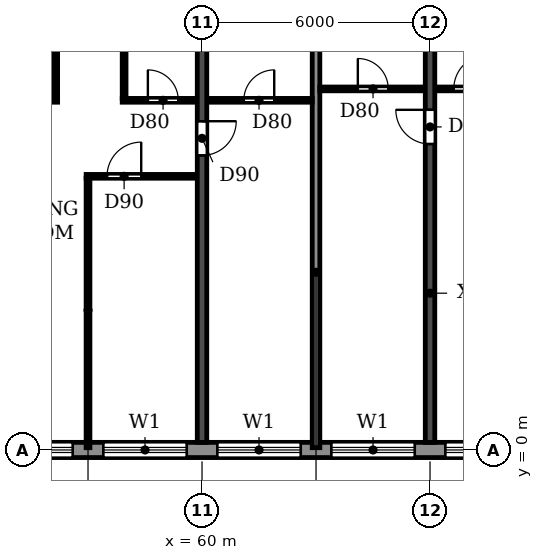
"""IFC4 building model, lengths in metres.
Left out: names, types, materials, properties, quantities, classifications, styles, units other than length and angle.
Written with IfcOpenShell. Run it as: python <this file> out.ifc"""

import sys

from ifc_helpers import new_model, si_unit, direction, frame, frame_2d, origin, place, context, subcontext, project, spatial, rectangle, extrude, element, fill, save


model = new_model("IFC4")
c1 = context("Model", 3, precision=1e-05, world=origin(), true_north=direction((0.0, 1.0)))
c2 = subcontext(c1, "Body", "Model", "MODEL_VIEW")
j1 = project(units=[si_unit("LENGTHUNIT", "METRE"), si_unit("PLANEANGLEUNIT", "RADIAN")], contexts=[c1])
p1 = place(None, origin())
s1 = spatial("IfcSite", under=j1, at=p1, CompositionType="ELEMENT")
p2 = place(p1, origin())
s2 = spatial("IfcBuilding", under=s1, at=p2, CompositionType="ELEMENT")
p3 = place(p2, frame((0.0, 0.0, 201.6)))
s3 = spatial("IfcBuildingStorey", under=s2, at=p3, CompositionType="ELEMENT", Elevation=201.6)
p4 = place(p3, frame((60.0, 0.2, 0.0), z_axis=(0.0, 0.0, 1.0), x_axis=(0.0, 1.0, 0.0)))
e1 = element("IfcWall", 1, at=p4, inside=s3, PredefinedType="SHEAR", context=c2, shape_type="SweptSolid", body=[
    extrude(rectangle(XDim=11.7, YDim=0.25, at=frame_2d((5.85, 0.0))), origin(), (0.0, 0.0, 1.0), 3.08),
])
p5 = place(p4, frame((7.55, 0.0, 0.0)))
e2 = element("IfcOpeningElement", 2, at=p5, cuts=e1, PredefinedType="OPENING", context=c2, shape_type="SweptSolid", body=[
    extrude(rectangle(XDim=0.9, YDim=2.1, at=frame_2d((0.45, 1.05))), frame((0.0, 0.135, 0.0), z_axis=(0.0, -1.0, 0.0), x_axis=(1.0, 0.0, 0.0)), (0.0, 0.0, 1.0), 0.27),
])
p6 = place(p3, frame((66.0, 0.2, 0.0), z_axis=(0.0, 0.0, 1.0), x_axis=(0.0, 1.0, 0.0)))
e3 = element("IfcWall", 3, at=p6, inside=s3, PredefinedType="SHEAR", context=c2, shape_type="SweptSolid", body=[
    extrude(rectangle(XDim=11.7, YDim=0.25, at=frame_2d((5.85, 0.0))), origin(), (0.0, 0.0, 1.0), 3.08),
])
p7 = place(p6, frame((7.85, 0.0, 0.0)))
e4 = element("IfcOpeningElement", 4, at=p7, cuts=e3, PredefinedType="OPENING", context=c2, shape_type="SweptSolid", body=[
    extrude(rectangle(XDim=0.9, YDim=2.1, at=frame_2d((0.45, 1.05))), frame((0.0, 0.135, 0.0), z_axis=(0.0, -1.0, 0.0), x_axis=(1.0, 0.0, 0.0)), (0.0, 0.0, 1.0), 0.27),
])
p8 = place(p3, frame((22.683, 0.0, 0.0), z_axis=(0.0, 0.0, 1.0), x_axis=(1.0, 0.0, 0.0)))
e5 = element("IfcWall", 5, at=p8, inside=s3, PredefinedType="STANDARD", context=c2, shape_type="SweptSolid", body=[
    extrude(rectangle(XDim=56.634, YDim=0.4, at=frame_2d((28.317, 0.0))), origin(), (0.0, 0.0, 1.0), 3.08),
])
p9 = place(p8, frame((1.917, 0.0, 0.0)))
e6 = element("IfcOpeningElement", 6, at=p9, cuts=e5, PredefinedType="OPENING", context=c2, shape_type="SweptSolid", body=[
    extrude(rectangle(XDim=1.8, YDim=2.4, at=frame_2d((0.9, 1.2))), frame((0.0, 0.21, 0.0), z_axis=(0.0, -1.0, 0.0), x_axis=(1.0, 0.0, 0.0)), (0.0, 0.0, 1.0), 0.42),
])
p10 = place(p8, frame((4.717, 0.0, 0.9)))
e7 = element("IfcOpeningElement", 7, at=p10, cuts=e5, PredefinedType="OPENING", context=c2, shape_type="SweptSolid", body=[
    extrude(rectangle(XDim=2.2, YDim=1.5, at=frame_2d((1.1, 0.75))), frame((0.0, 0.21, 0.0), z_axis=(0.0, -1.0, 0.0), x_axis=(1.0, 0.0, 0.0)), (0.0, 0.0, 1.0), 0.42),
])
p11 = place(p8, frame((7.717, 0.0, 0.9)))
e8 = element("IfcOpeningElement", 8, at=p11, cuts=e5, PredefinedType="OPENING", context=c2, shape_type="SweptSolid", body=[
    extrude(rectangle(XDim=2.2, YDim=1.5, at=frame_2d((1.1, 0.75))), frame((0.0, 0.21, 0.0), z_axis=(0.0, -1.0, 0.0), x_axis=(1.0, 0.0, 0.0)), (0.0, 0.0, 1.0), 0.42),
])
p12 = place(p8, frame((10.717, 0.0, 0.9)))
e9 = element("IfcOpeningElement", 9, at=p12, cuts=e5, PredefinedType="OPENING", context=c2, shape_type="SweptSolid", body=[
    extrude(rectangle(XDim=2.2, YDim=1.5, at=frame_2d((1.1, 0.75))), frame((0.0, 0.21, 0.0), z_axis=(0.0, -1.0, 0.0), x_axis=(1.0, 0.0, 0.0)), (0.0, 0.0, 1.0), 0.42),
])
p13 = place(p8, frame((13.917, 0.0, 0.0)))
e10 = element("IfcOpeningElement", 10, at=p13, cuts=e5, PredefinedType="OPENING", context=c2, shape_type="SweptSolid", body=[
    extrude(rectangle(XDim=1.8, YDim=2.4, at=frame_2d((0.9, 1.2))), frame((0.0, 0.21, 0.0), z_axis=(0.0, -1.0, 0.0), x_axis=(1.0, 0.0, 0.0)), (0.0, 0.0, 1.0), 0.42),
])
p14 = place(p8, frame((16.717, 0.0, 0.9)))
e11 = element("IfcOpeningElement", 11, at=p14, cuts=e5, PredefinedType="OPENING", context=c2, shape_type="SweptSolid", body=[
    extrude(rectangle(XDim=2.2, YDim=1.5, at=frame_2d((1.1, 0.75))), frame((0.0, 0.21, 0.0), z_axis=(0.0, -1.0, 0.0), x_axis=(1.0, 0.0, 0.0)), (0.0, 0.0, 1.0), 0.42),
])
p15 = place(p8, frame((19.717, 0.0, 0.9)))
e12 = element("IfcOpeningElement", 12, at=p15, cuts=e5, PredefinedType="OPENING", context=c2, shape_type="SweptSolid", body=[
    extrude(rectangle(XDim=2.2, YDim=1.5, at=frame_2d((1.1, 0.75))), frame((0.0, 0.21, 0.0), z_axis=(0.0, -1.0, 0.0), x_axis=(1.0, 0.0, 0.0)), (0.0, 0.0, 1.0), 0.42),
])
p16 = place(p8, frame((22.717, 0.0, 0.9)))
e13 = element("IfcOpeningElement", 13, at=p16, cuts=e5, PredefinedType="OPENING", context=c2, shape_type="SweptSolid", body=[
    extrude(rectangle(XDim=2.2, YDim=1.5, at=frame_2d((1.1, 0.75))), frame((0.0, 0.21, 0.0), z_axis=(0.0, -1.0, 0.0), x_axis=(1.0, 0.0, 0.0)), (0.0, 0.0, 1.0), 0.42),
])
p17 = place(p8, frame((25.917, 0.0, 0.0)))
e14 = element("IfcOpeningElement", 14, at=p17, cuts=e5, PredefinedType="OPENING", context=c2, shape_type="SweptSolid", body=[
    extrude(rectangle(XDim=1.8, YDim=2.4, at=frame_2d((0.9, 1.2))), frame((0.0, 0.21, 0.0), z_axis=(0.0, -1.0, 0.0), x_axis=(1.0, 0.0, 0.0)), (0.0, 0.0, 1.0), 0.42),
])
p18 = place(p8, frame((28.717, 0.0, 0.9)))
e15 = element("IfcOpeningElement", 15, at=p18, cuts=e5, PredefinedType="OPENING", context=c2, shape_type="SweptSolid", body=[
    extrude(rectangle(XDim=2.2, YDim=1.5, at=frame_2d((1.1, 0.75))), frame((0.0, 0.21, 0.0), z_axis=(0.0, -1.0, 0.0), x_axis=(1.0, 0.0, 0.0)), (0.0, 0.0, 1.0), 0.42),
])
p19 = place(p8, frame((31.717, 0.0, 0.9)))
e16 = element("IfcOpeningElement", 16, at=p19, cuts=e5, PredefinedType="OPENING", context=c2, shape_type="SweptSolid", body=[
    extrude(rectangle(XDim=2.2, YDim=1.5, at=frame_2d((1.1, 0.75))), frame((0.0, 0.21, 0.0), z_axis=(0.0, -1.0, 0.0), x_axis=(1.0, 0.0, 0.0)), (0.0, 0.0, 1.0), 0.42),
])
p20 = place(p8, frame((34.717, 0.0, 0.9)))
e17 = element("IfcOpeningElement", 17, at=p20, cuts=e5, PredefinedType="OPENING", context=c2, shape_type="SweptSolid", body=[
    extrude(rectangle(XDim=2.2, YDim=1.5, at=frame_2d((1.1, 0.75))), frame((0.0, 0.21, 0.0), z_axis=(0.0, -1.0, 0.0), x_axis=(1.0, 0.0, 0.0)), (0.0, 0.0, 1.0), 0.42),
])
p21 = place(p8, frame((37.717, 0.0, 0.9)))
e18 = element("IfcOpeningElement", 18, at=p21, cuts=e5, PredefinedType="OPENING", context=c2, shape_type="SweptSolid", body=[
    extrude(rectangle(XDim=2.2, YDim=1.5, at=frame_2d((1.1, 0.75))), frame((0.0, 0.21, 0.0), z_axis=(0.0, -1.0, 0.0), x_axis=(1.0, 0.0, 0.0)), (0.0, 0.0, 1.0), 0.42),
])
p22 = place(p8, frame((40.717, 0.0, 0.9)))
e19 = element("IfcOpeningElement", 19, at=p22, cuts=e5, PredefinedType="OPENING", context=c2, shape_type="SweptSolid", body=[
    extrude(rectangle(XDim=2.2, YDim=1.5, at=frame_2d((1.1, 0.75))), frame((0.0, 0.21, 0.0), z_axis=(0.0, -1.0, 0.0), x_axis=(1.0, 0.0, 0.0)), (0.0, 0.0, 1.0), 0.42),
])
p23 = place(p8, frame((43.717, 0.0, 0.9)))
e20 = element("IfcOpeningElement", 20, at=p23, cuts=e5, PredefinedType="OPENING", context=c2, shape_type="SweptSolid", body=[
    extrude(rectangle(XDim=2.2, YDim=1.5, at=frame_2d((1.1, 0.75))), frame((0.0, 0.21, 0.0), z_axis=(0.0, -1.0, 0.0), x_axis=(1.0, 0.0, 0.0)), (0.0, 0.0, 1.0), 0.42),
])
p24 = place(p8, frame((46.717, 0.0, 0.9)))
e21 = element("IfcOpeningElement", 21, at=p24, cuts=e5, PredefinedType="OPENING", context=c2, shape_type="SweptSolid", body=[
    extrude(rectangle(XDim=2.2, YDim=1.5, at=frame_2d((1.1, 0.75))), frame((0.0, 0.21, 0.0), z_axis=(0.0, -1.0, 0.0), x_axis=(1.0, 0.0, 0.0)), (0.0, 0.0, 1.0), 0.42),
])
p25 = place(p8, frame((49.717, 0.0, 0.9)))
e22 = element("IfcOpeningElement", 22, at=p25, cuts=e5, PredefinedType="OPENING", context=c2, shape_type="SweptSolid", body=[
    extrude(rectangle(XDim=2.2, YDim=1.5, at=frame_2d((1.1, 0.75))), frame((0.0, 0.21, 0.0), z_axis=(0.0, -1.0, 0.0), x_axis=(1.0, 0.0, 0.0)), (0.0, 0.0, 1.0), 0.42),
])
p26 = place(p8, frame((52.917, 0.0, 0.0)))
e23 = element("IfcOpeningElement", 23, at=p26, cuts=e5, PredefinedType="OPENING", context=c2, shape_type="SweptSolid", body=[
    extrude(rectangle(XDim=1.8, YDim=2.4, at=frame_2d((0.9, 1.2))), frame((0.0, 0.21, 0.0), z_axis=(0.0, -1.0, 0.0), x_axis=(1.0, 0.0, 0.0)), (0.0, 0.0, 1.0), 0.42),
])
p27 = place(p3, frame((63.0, 0.06, 0.0), z_axis=(0.0, 0.0, 1.0), x_axis=(0.0, 1.0, 0.0)))
e24 = element("IfcWall", 24, at=p27, inside=s3, PredefinedType="PARTITIONING", context=c2, shape_type="SweptSolid", body=[
    extrude(rectangle(XDim=11.83, YDim=0.2, at=frame_2d((5.915, 0.0))), origin(), (0.0, 0.0, 1.0), 3.08),
])
p28 = place(p3, frame((56.95, 7.2, 0.0), z_axis=(0.0, 0.0, 1.0), x_axis=(1.0, 0.0, 0.0)))
e25 = element("IfcWall", 25, at=p28, inside=s3, PredefinedType="PARTITIONING", context=c2, shape_type="SweptSolid", body=[
    extrude(rectangle(XDim=2.915, YDim=0.1, at=frame_2d((1.458, 0.0))), origin(), (0.0, 0.0, 1.0), 3.08),
])
p29 = place(p28, frame((0.55, 0.0, 0.0)))
e26 = element("IfcOpeningElement", 26, at=p29, cuts=e25, PredefinedType="OPENING", context=c2, shape_type="SweptSolid", body=[
    extrude(rectangle(XDim=0.9, YDim=2.1, at=frame_2d((0.45, 1.05))), frame((0.0, 0.06, 0.0), z_axis=(0.0, -1.0, 0.0), x_axis=(1.0, 0.0, 0.0)), (0.0, 0.0, 1.0), 0.12),
])
p30 = place(p3, frame((54.135, 9.2, 0.0), z_axis=(0.0, 0.0, 1.0), x_axis=(1.0, 0.0, 0.0)))
e27 = element("IfcWall", 27, at=p30, inside=s3, PredefinedType="PARTITIONING", context=c2, shape_type="SweptSolid", body=[
    extrude(rectangle(XDim=2.065, YDim=0.1, at=frame_2d((1.032, 0.0))), origin(), (0.0, 0.0, 1.0), 3.08),
])
p31 = place(p30, frame((0.49, 0.0, 0.0)))
e28 = element("IfcOpeningElement", 28, at=p31, cuts=e27, PredefinedType="OPENING", context=c2, shape_type="SweptSolid", body=[
    extrude(rectangle(XDim=0.9, YDim=2.1, at=frame_2d((0.45, 1.05))), frame((0.0, 0.06, 0.0), z_axis=(0.0, -1.0, 0.0), x_axis=(1.0, 0.0, 0.0)), (0.0, 0.0, 1.0), 0.12),
])
p32 = place(p3, frame((57.9, 9.2, 0.0), z_axis=(0.0, 0.0, 1.0), x_axis=(1.0, 0.0, 0.0)))
e29 = element("IfcWall", 29, at=p32, inside=s3, PredefinedType="PARTITIONING", context=c2, shape_type="SweptSolid", body=[
    extrude(rectangle(XDim=1.965, YDim=0.1, at=frame_2d((0.982, 0.0))), origin(), (0.0, 0.0, 1.0), 3.08),
])
p33 = place(p32, frame((0.675, 0.0, 0.0)))
e30 = element("IfcOpeningElement", 30, at=p33, cuts=e29, PredefinedType="OPENING", context=c2, shape_type="SweptSolid", body=[
    extrude(rectangle(XDim=0.8, YDim=2.1, at=frame_2d((0.4, 1.05))), frame((0.0, 0.06, 0.0), z_axis=(0.0, -1.0, 0.0), x_axis=(1.0, 0.0, 0.0)), (0.0, 0.0, 1.0), 0.12),
])
p34 = place(p3, frame((60.135, 9.2, 0.0), z_axis=(0.0, 0.0, 1.0), x_axis=(1.0, 0.0, 0.0)))
e31 = element("IfcWall", 31, at=p34, inside=s3, PredefinedType="PARTITIONING", context=c2, shape_type="SweptSolid", body=[
    extrude(rectangle(XDim=2.765, YDim=0.1, at=frame_2d((1.382, 0.0))), origin(), (0.0, 0.0, 1.0), 3.08),
])
p35 = place(p34, frame((0.965, 0.0, 0.0)))
e32 = element("IfcOpeningElement", 32, at=p35, cuts=e31, PredefinedType="OPENING", context=c2, shape_type="SweptSolid", body=[
    extrude(rectangle(XDim=0.8, YDim=2.1, at=frame_2d((0.4, 1.05))), frame((0.0, 0.06, 0.0), z_axis=(0.0, -1.0, 0.0), x_axis=(1.0, 0.0, 0.0)), (0.0, 0.0, 1.0), 0.12),
])
p36 = place(p3, frame((63.1, 9.5, 0.0), z_axis=(0.0, 0.0, 1.0), x_axis=(1.0, 0.0, 0.0)))
e33 = element("IfcWall", 33, at=p36, inside=s3, PredefinedType="PARTITIONING", context=c2, shape_type="SweptSolid", body=[
    extrude(rectangle(XDim=2.765, YDim=0.1, at=frame_2d((1.382, 0.0))), origin(), (0.0, 0.0, 1.0), 3.08),
])
p37 = place(p36, frame((1.0, 0.0, 0.0)))
e34 = element("IfcOpeningElement", 34, at=p37, cuts=e33, PredefinedType="OPENING", context=c2, shape_type="SweptSolid", body=[
    extrude(rectangle(XDim=0.8, YDim=2.1, at=frame_2d((0.4, 1.05))), frame((0.0, 0.06, 0.0), z_axis=(0.0, -1.0, 0.0), x_axis=(1.0, 0.0, 0.0)), (0.0, 0.0, 1.0), 0.12),
])
p38 = place(p3, frame((66.135, 9.5, 0.0), z_axis=(0.0, 0.0, 1.0), x_axis=(1.0, 0.0, 0.0)))
e35 = element("IfcWall", 35, at=p38, inside=s3, PredefinedType="PARTITIONING", context=c2, shape_type="SweptSolid", body=[
    extrude(rectangle(XDim=2.065, YDim=0.1, at=frame_2d((1.032, 0.0))), origin(), (0.0, 0.0, 1.0), 3.08),
])
p39 = place(p38, frame((0.49, 0.0, 0.0)))
e36 = element("IfcOpeningElement", 36, at=p39, cuts=e35, PredefinedType="OPENING", context=c2, shape_type="SweptSolid", body=[
    extrude(rectangle(XDim=0.9, YDim=2.1, at=frame_2d((0.45, 1.05))), frame((0.0, 0.06, 0.0), z_axis=(0.0, -1.0, 0.0), x_axis=(1.0, 0.0, 0.0)), (0.0, 0.0, 1.0), 0.12),
])
p40 = place(p3, frame((56.15, 9.25, 0.0), z_axis=(0.0, 0.0, 1.0), x_axis=(0.0, 1.0, 0.0)))
e37 = element("IfcWall", 37, at=p40, inside=s3, PredefinedType="PARTITIONING", context=c2, shape_type="SweptSolid", body=[
    extrude(rectangle(XDim=2.64, YDim=0.1, at=frame_2d((1.32, 0.0))), origin(), (0.0, 0.0, 1.0), 3.08),
])
p41 = place(p3, frame((57.0, 0.06, 0.0), z_axis=(0.0, 0.0, 1.0), x_axis=(0.0, 1.0, 0.0)))
e38 = element("IfcWall", 38, at=p41, inside=s3, PredefinedType="PARTITIONING", context=c2, shape_type="SweptSolid", body=[
    extrude(rectangle(XDim=7.09, YDim=0.1, at=frame_2d((3.545, 0.0))), origin(), (0.0, 0.0, 1.0), 3.08),
])
p42 = place(p3, frame((57.95, 9.25, 0.0), z_axis=(0.0, 0.0, 1.0), x_axis=(0.0, 1.0, 0.0)))
e39 = element("IfcWall", 39, at=p42, inside=s3, PredefinedType="PARTITIONING", context=c2, shape_type="SweptSolid", body=[
    extrude(rectangle(XDim=2.64, YDim=0.1, at=frame_2d((1.32, 0.0))), origin(), (0.0, 0.0, 1.0), 3.08),
])
p43 = place(p19, origin())
e40 = element("IfcWindow", 40, at=p43, inside=s3, PartitioningType="DOUBLE_PANEL_HORIZONTAL", PredefinedType="WINDOW", context=c2, shape_type="SweptSolid", body=[
    extrude(rectangle(XDim=2.2, YDim=1.5, at=frame_2d((1.1, 0.75))), frame((0.0, 0.03, 0.0), z_axis=(0.0, -1.0, 0.0), x_axis=(1.0, 0.0, 0.0)), (0.0, 0.0, 1.0), 0.06),
])
fill(e16, e40)
p44 = place(p20, origin())
e41 = element("IfcWindow", 41, at=p44, inside=s3, PartitioningType="DOUBLE_PANEL_HORIZONTAL", PredefinedType="WINDOW", context=c2, shape_type="SweptSolid", body=[
    extrude(rectangle(XDim=2.2, YDim=1.5, at=frame_2d((1.1, 0.75))), frame((0.0, 0.03, 0.0), z_axis=(0.0, -1.0, 0.0), x_axis=(1.0, 0.0, 0.0)), (0.0, 0.0, 1.0), 0.06),
])
fill(e17, e41)
p45 = place(p21, origin())
e42 = element("IfcWindow", 42, at=p45, inside=s3, PartitioningType="DOUBLE_PANEL_HORIZONTAL", PredefinedType="WINDOW", context=c2, shape_type="SweptSolid", body=[
    extrude(rectangle(XDim=2.2, YDim=1.5, at=frame_2d((1.1, 0.75))), frame((0.0, 0.03, 0.0), z_axis=(0.0, -1.0, 0.0), x_axis=(1.0, 0.0, 0.0)), (0.0, 0.0, 1.0), 0.06),
])
fill(e18, e42)
p46 = place(p22, origin())
e43 = element("IfcWindow", 43, at=p46, inside=s3, PartitioningType="DOUBLE_PANEL_HORIZONTAL", PredefinedType="WINDOW", context=c2, shape_type="SweptSolid", body=[
    extrude(rectangle(XDim=2.2, YDim=1.5, at=frame_2d((1.1, 0.75))), frame((0.0, 0.03, 0.0), z_axis=(0.0, -1.0, 0.0), x_axis=(1.0, 0.0, 0.0)), (0.0, 0.0, 1.0), 0.06),
])
fill(e19, e43)
p47 = place(p23, origin())
e44 = element("IfcWindow", 44, at=p47, inside=s3, PartitioningType="DOUBLE_PANEL_HORIZONTAL", PredefinedType="WINDOW", context=c2, shape_type="SweptSolid", body=[
    extrude(rectangle(XDim=2.2, YDim=1.5, at=frame_2d((1.1, 0.75))), frame((0.0, 0.03, 0.0), z_axis=(0.0, -1.0, 0.0), x_axis=(1.0, 0.0, 0.0)), (0.0, 0.0, 1.0), 0.06),
])
fill(e20, e44)
p48 = place(p35, origin())
e45 = element("IfcDoor", 45, at=p48, inside=s3, OperationType="SINGLE_SWING_RIGHT", PredefinedType="DOOR", context=c2, shape_type="SweptSolid", body=[
    extrude(rectangle(XDim=0.8, YDim=2.1, at=frame_2d((0.4, 1.05))), frame((0.0, 0.025, 0.0), z_axis=(0.0, -1.0, 0.0), x_axis=(1.0, 0.0, 0.0)), (0.0, 0.0, 1.0), 0.05),
])
fill(e32, e45)
p49 = place(p29, origin())
e46 = element("IfcDoor", 46, at=p49, inside=s3, OperationType="SINGLE_SWING_RIGHT", PredefinedType="DOOR", context=c2, shape_type="SweptSolid", body=[
    extrude(rectangle(XDim=0.9, YDim=2.1, at=frame_2d((0.45, 1.05))), frame((0.0, 0.025, 0.0), z_axis=(0.0, -1.0, 0.0), x_axis=(1.0, 0.0, 0.0)), (0.0, 0.0, 1.0), 0.05),
])
fill(e26, e46)
p50 = place(p33, origin())
e47 = element("IfcDoor", 47, at=p50, inside=s3, OperationType="SINGLE_SWING_LEFT", PredefinedType="DOOR", context=c2, shape_type="SweptSolid", body=[
    extrude(rectangle(XDim=0.8, YDim=2.1, at=frame_2d((0.4, 1.05))), frame((0.0, 0.025, 0.0), z_axis=(0.0, -1.0, 0.0), x_axis=(1.0, 0.0, 0.0)), (0.0, 0.0, 1.0), 0.05),
])
fill(e30, e47)
p51 = place(p5, frame((0.9, 0.0, 0.0), z_axis=(0.0, 0.0, 1.0), x_axis=(-1.0, 0.0, 0.0)))
e48 = element("IfcDoor", 48, at=p51, inside=s3, OperationType="SINGLE_SWING_LEFT", PredefinedType="DOOR", context=c2, shape_type="SweptSolid", body=[
    extrude(rectangle(XDim=0.9, YDim=2.1, at=frame_2d((0.45, 1.05))), frame((0.0, 0.025, 0.0), z_axis=(0.0, -1.0, 0.0), x_axis=(1.0, 0.0, 0.0)), (0.0, 0.0, 1.0), 0.05),
])
fill(e2, e48)
p52 = place(p37, origin())
e49 = element("IfcDoor", 49, at=p52, inside=s3, OperationType="SINGLE_SWING_LEFT", PredefinedType="DOOR", context=c2, shape_type="SweptSolid", body=[
    extrude(rectangle(XDim=0.8, YDim=2.1, at=frame_2d((0.4, 1.05))), frame((0.0, 0.025, 0.0), z_axis=(0.0, -1.0, 0.0), x_axis=(1.0, 0.0, 0.0)), (0.0, 0.0, 1.0), 0.05),
])
fill(e34, e49)
p53 = place(p7, origin())
e50 = element("IfcDoor", 50, at=p53, inside=s3, OperationType="SINGLE_SWING_RIGHT", PredefinedType="DOOR", context=c2, shape_type="SweptSolid", body=[
    extrude(rectangle(XDim=0.9, YDim=2.1, at=frame_2d((0.45, 1.05))), frame((0.0, 0.025, 0.0), z_axis=(0.0, -1.0, 0.0), x_axis=(1.0, 0.0, 0.0)), (0.0, 0.0, 1.0), 0.05),
])
fill(e4, e50)
p54 = place(p39, origin())
e51 = element("IfcDoor", 51, at=p54, inside=s3, OperationType="SINGLE_SWING_RIGHT", PredefinedType="DOOR", context=c2, shape_type="SweptSolid", body=[
    extrude(rectangle(XDim=0.9, YDim=2.1, at=frame_2d((0.45, 1.05))), frame((0.0, 0.025, 0.0), z_axis=(0.0, -1.0, 0.0), x_axis=(1.0, 0.0, 0.0)), (0.0, 0.0, 1.0), 0.05),
])
fill(e36, e51)
save(model, sys.argv[1])
